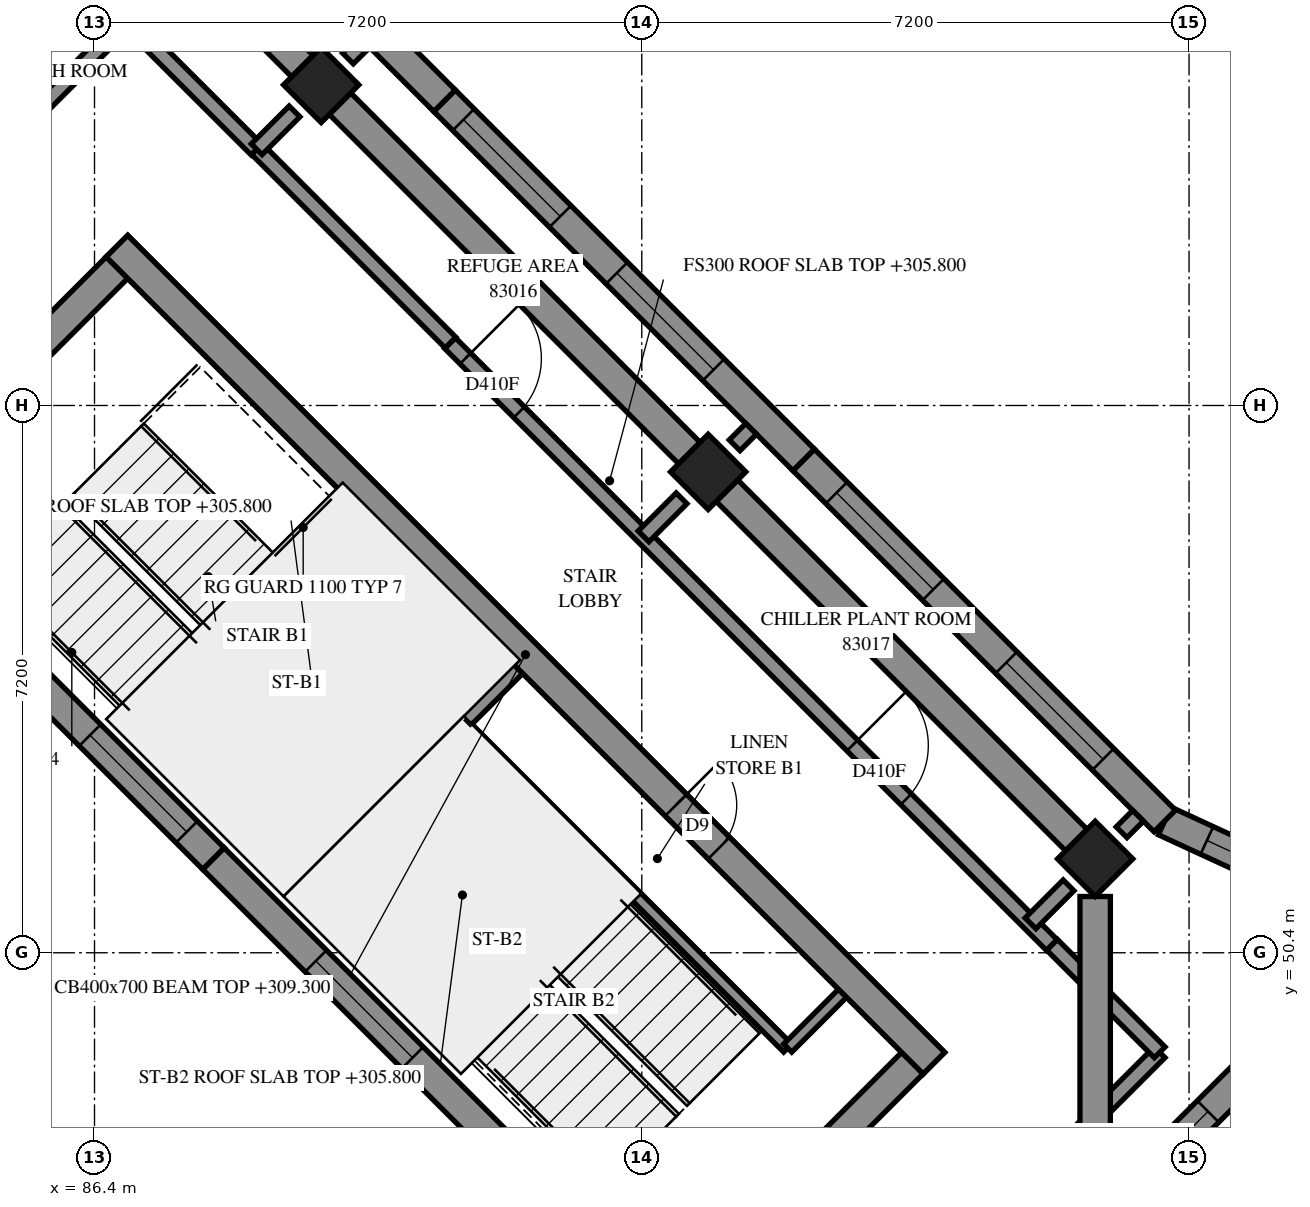
"""IFC4 building model, lengths in metres.
Left out: names, types, materials, properties, quantities, classifications, styles, units other than length and angle.
Written with IfcOpenShell. Run it as: python <this file> out.ifc"""

import sys

from ifc_helpers import new_model, si_unit, direction, frame, frame_2d, origin, origin_2d, place, context, subcontext, project, spatial, polyline, rectangle, outline, extrude, element, fill, save


model = new_model("IFC4")
c1 = context("Model", 3, precision=1e-05, world=origin(), true_north=direction((0.0, 1.0)))
c2 = subcontext(c1, "Body", "Model", "MODEL_VIEW")
j1 = project(units=[si_unit("LENGTHUNIT", "METRE"), si_unit("PLANEANGLEUNIT", "RADIAN")], contexts=[c1])
p1 = place(None, origin())
s1 = spatial("IfcSite", under=j1, at=p1, CompositionType="ELEMENT")
p2 = place(p1, origin())
s2 = spatial("IfcBuilding", under=s1, at=p2, CompositionType="ELEMENT")
p3 = place(p2, frame((0.0, 0.0, 305.8)))
s3 = spatial("IfcBuildingStorey", under=s2, at=p3, CompositionType="ELEMENT", Elevation=305.8)
for number, where, z_axis, x_axis in (
    (1, (89.382, 61.818, 0.0), (0.0, 0.0, 1.0), (0.707, -0.707, 0.0)),
    (2, (94.474, 56.727, 0.0), (0.0, 0.0, 1.0), (0.707, -0.707, 0.0)),
    (3, (99.565, 51.635, 0.0), (0.0, 0.0, 1.0), (0.707, -0.707, 0.0)),
):
    element("IfcColumn", number, at=place(p3, frame(where, z_axis=z_axis, x_axis=x_axis)), inside=s3, PredefinedType="COLUMN", context=c2, shape_type="SweptSolid", body=[
        extrude(rectangle(XDim=0.7, YDim=0.7, at=origin_2d()), origin(), (0.0, 0.0, 1.0), 3.5),
    ])
p4 = place(p3, frame((86.695, 59.696, -0.3), z_axis=(0.0, 0.0, 1.0), x_axis=(0.7071100706, -0.7071034917, 0.0)))
e4 = element("IfcWall", 4, at=p4, inside=s3, PredefinedType="SHEAR", context=c2, shape_type="SweptSolid", body=[
    extrude(outline(polyline([(0.0, 0.0), (15.2, 0.0), (15.2, 3.1), (0.0, 3.1), (0.0, 0.0)])), frame((0.0, 0.2, 0.0), z_axis=(0.0, -1.0, 0.0), x_axis=(1.0, 0.0, 0.0)), (0.0, 0.0, 1.0), 0.4),
])
p5 = place(p4, frame((10.4, 0.0, 0.3)))
e5 = element("IfcOpeningElement", 5, at=p5, cuts=e4, PredefinedType="OPENING", context=c2, shape_type="SweptSolid", body=[
    extrude(rectangle(XDim=0.8, YDim=2.1, at=frame_2d((0.4, 1.05))), frame((0.0, 0.21, 0.0), z_axis=(0.0, -1.0, 0.0), x_axis=(1.0, 0.0, 0.0)), (0.0, 0.0, 1.0), 0.42),
])
p6 = place(p3, frame((83.796, 56.514, -0.3), z_axis=(0.0, 0.0, 1.0), x_axis=(0.7071067812, 0.7071067812, 0.0)))
e6 = element("IfcWall", 6, at=p6, inside=s3, PredefinedType="SHEAR", context=c2, shape_type="SweptSolid", body=[
    extrude(outline(polyline([(0.0, 0.0), (4.1, 0.0), (4.1, 3.1), (0.0, 3.1), (0.0, 0.0)])), frame((0.0, 0.2, 0.0), z_axis=(0.0, -1.0, 0.0), x_axis=(1.0, 0.0, 0.0)), (0.0, 0.0, 1.0), 0.4),
])
p7 = place(p6, frame((1.05, 0.0, 0.3)))
e7 = element("IfcOpeningElement", 7, at=p7, cuts=e6, PredefinedType="OPENING", context=c2, shape_type="SweptSolid", body=[
    extrude(rectangle(XDim=1.1, YDim=2.1, at=frame_2d((0.55, 1.05))), frame((0.0, 0.21, 0.0), z_axis=(0.0, -1.0, 0.0), x_axis=(1.0, 0.0, 0.0)), (0.0, 0.0, 1.0), 0.42),
])
p8 = place(p3, frame((94.261, 46.049, -0.3), z_axis=(0.0, 0.0, 1.0), x_axis=(0.7071067812, 0.7071067812, 0.0)))
e8 = element("IfcWall", 8, at=p8, inside=s3, PredefinedType="SHEAR", context=c2, shape_type="SweptSolid", body=[
    extrude(outline(polyline([(0.0, 0.0), (4.1, 0.0), (4.1, 3.1), (0.0, 3.1), (0.0, 0.0)])), frame((0.0, 0.2, 0.0), z_axis=(0.0, -1.0, 0.0), x_axis=(1.0, 0.0, 0.0)), (0.0, 0.0, 1.0), 0.4),
])
p9 = place(p8, frame((1.05, 0.0, 0.3)))
e9 = element("IfcOpeningElement", 9, at=p9, cuts=e8, PredefinedType="OPENING", context=c2, shape_type="SweptSolid", body=[
    extrude(rectangle(XDim=1.1, YDim=2.1, at=frame_2d((0.55, 1.05))), frame((0.0, 0.21, 0.0), z_axis=(0.0, -1.0, 0.0), x_axis=(1.0, 0.0, 0.0)), (0.0, 0.0, 1.0), 0.42),
])
p10 = place(p3, frame((89.029, 51.282, 0.0), z_axis=(0.0, 0.0, 1.0), x_axis=(0.7071067812, 0.7071067812, 0.0)))
e10 = element("IfcWall", 10, at=p10, inside=s3, PredefinedType="SOLIDWALL", context=c2, shape_type="SweptSolid", body=[
    extrude(outline(polyline([(0.0, 0.0), (4.1, 0.0), (4.1, 3.5), (0.0, 3.5), (0.0, 0.0)])), frame((0.0, 0.15, 0.0), z_axis=(0.0, -1.0, 0.0), x_axis=(1.0, 0.0, 0.0)), (0.0, 0.0, 1.0), 0.3),
])
p11 = place(p3, frame((99.282, 46.544, 0.0), z_axis=(0.0, 0.0, 1.0), x_axis=(0.7071067812, 0.7071067812, 0.0)))
e11 = element("IfcWall", 11, at=p11, inside=s3, PredefinedType="SOLIDWALL", context=c2, shape_type="SweptSolid", body=[
    extrude(outline(polyline([(0.2, -0.2), (6.23, -0.2), (5.657, 0.2), (-0.2, 0.2), (0.2, -0.2)])), origin(), (0.0, 0.0, 1.0), 3.5),
])
p12 = place(p11, frame((0.7, 0.0, 0.7)))
e12 = element("IfcOpeningElement", 12, at=p12, cuts=e11, PredefinedType="OPENING", context=c2, shape_type="SweptSolid", body=[
    extrude(rectangle(XDim=1.8, YDim=2.2, at=frame_2d((0.9, 1.1))), frame((0.0, 0.21, 0.0), z_axis=(0.0, -1.0, 0.0), x_axis=(1.0, 0.0, 0.0)), (0.0, 0.0, 1.0), 0.42),
])
p13 = place(p3, frame((103.484, 50.747, 0.0), z_axis=(0.0, 0.0, 1.0), x_axis=(-0.9078558767, 0.4192823716, 0.0)))
e13 = element("IfcWall", 13, at=p13, inside=s3, PredefinedType="SOLIDWALL", context=c2, shape_type="SweptSolid", body=[
    extrude(outline(polyline([(-0.287, -0.2), (3.273, -0.2), (3.345, 0.2), (0.287, 0.2), (-0.287, -0.2)])), origin(), (0.0, 0.0, 1.0), 3.5),
])
p14 = place(p13, frame((0.898, 0.0, 0.7)))
e14 = element("IfcOpeningElement", 14, at=p14, cuts=e13, PredefinedType="OPENING", context=c2, shape_type="SweptSolid", body=[
    extrude(rectangle(XDim=1.8, YDim=2.2, at=frame_2d((0.9, 1.1))), frame((0.0, 0.21, 0.0), z_axis=(0.0, -1.0, 0.0), x_axis=(1.0, 0.0, 0.0)), (0.0, 0.0, 1.0), 0.42),
])
p15 = place(p3, frame((100.48, 52.134, 0.0), z_axis=(0.0, 0.0, 1.0), x_axis=(-0.7071067812, 0.7071067812, 0.0)))
e15 = element("IfcWall", 15, at=p15, inside=s3, PredefinedType="SOLIDWALL", context=c2, shape_type="SweptSolid", body=[
    extrude(outline(polyline([(0.036, -0.2), (6.718, -0.2), (6.718, 0.2), (-0.036, 0.2), (0.036, -0.2)])), origin(), (0.0, 0.0, 1.0), 3.5),
])
p16 = place(p15, frame((1.147, 0.0, 0.7)))
e16 = element("IfcOpeningElement", 16, at=p16, cuts=e15, PredefinedType="OPENING", context=c2, shape_type="SweptSolid", body=[
    extrude(rectangle(XDim=1.8, YDim=2.2, at=frame_2d((0.9, 1.1))), frame((0.0, 0.21, 0.0), z_axis=(0.0, -1.0, 0.0), x_axis=(1.0, 0.0, 0.0)), (0.0, 0.0, 1.0), 0.42),
])
p17 = place(p15, frame((4.306, 0.0, 0.7)))
e17 = element("IfcOpeningElement", 17, at=p17, cuts=e15, PredefinedType="OPENING", context=c2, shape_type="SweptSolid", body=[
    extrude(rectangle(XDim=1.8, YDim=2.2, at=frame_2d((0.9, 1.1))), frame((0.0, 0.21, 0.0), z_axis=(0.0, -1.0, 0.0), x_axis=(1.0, 0.0, 0.0)), (0.0, 0.0, 1.0), 0.42),
])
p18 = place(p3, frame((95.73, 56.884, 0.0), z_axis=(0.0, 0.0, 1.0), x_axis=(-0.7071067812, 0.7071067812, 0.0)))
e18 = element("IfcWall", 18, at=p18, inside=s3, PredefinedType="SOLIDWALL", context=c2, shape_type="SweptSolid", body=[
    extrude(outline(polyline([(0.0, -0.2), (6.682, -0.2), (6.682, 0.2), (0.0, 0.2), (0.0, -0.2)])), origin(), (0.0, 0.0, 1.0), 3.5),
])
p19 = place(p18, frame((1.677, 0.0, 0.7)))
e19 = element("IfcOpeningElement", 19, at=p19, cuts=e18, PredefinedType="OPENING", context=c2, shape_type="SweptSolid", body=[
    extrude(rectangle(XDim=1.8, YDim=2.2, at=frame_2d((0.9, 1.1))), frame((0.0, 0.21, 0.0), z_axis=(0.0, -1.0, 0.0), x_axis=(1.0, 0.0, 0.0)), (0.0, 0.0, 1.0), 0.42),
])
p20 = place(p18, frame((4.529, 0.0, 0.7)))
e20 = element("IfcOpeningElement", 20, at=p20, cuts=e18, PredefinedType="OPENING", context=c2, shape_type="SweptSolid", body=[
    extrude(rectangle(XDim=1.8, YDim=2.2, at=frame_2d((0.9, 1.1))), frame((0.0, 0.21, 0.0), z_axis=(0.0, -1.0, 0.0), x_axis=(1.0, 0.0, 0.0)), (0.0, 0.0, 1.0), 0.42),
])
p21 = place(p3, frame((91.005, 61.609, 0.0), z_axis=(0.0, 0.0, 1.0), x_axis=(-0.7071142638, 0.7070992985, 0.0)))
e21 = element("IfcWall", 21, at=p21, inside=s3, PredefinedType="SOLIDWALL", context=c2, shape_type="SweptSolid", body=[
    extrude(outline(polyline([(0.0, -0.2), (6.682, -0.2), (6.682, 0.2), (0.0, 0.2), (0.0, -0.2)])), origin(), (0.0, 0.0, 1.0), 3.5),
])
p22 = place(p21, frame((2.195, 0.0, 0.7)))
e22 = element("IfcOpeningElement", 22, at=p22, cuts=e21, PredefinedType="OPENING", context=c2, shape_type="SweptSolid", body=[
    extrude(rectangle(XDim=1.8, YDim=2.2, at=frame_2d((0.9, 1.1))), frame((0.0, 0.21, 0.0), z_axis=(0.0, -1.0, 0.0), x_axis=(1.0, 0.0, 0.0)), (0.0, 0.0, 1.0), 0.42),
])
p23 = place(p3, frame((83.269, 56.334, 0.0), z_axis=(0.0, 0.0, 1.0), x_axis=(0.7071067812, -0.7071067812, 0.0)))
e23 = element("IfcWall", 23, at=p23, inside=s3, PredefinedType="SOLIDWALL", context=c2, shape_type="SweptSolid", body=[
    extrude(outline(polyline([(0.0, -0.2), (6.641, -0.2), (6.641, 0.2), (0.0, 0.2), (0.0, -0.2)])), origin(), (0.0, 0.0, 1.0), 3.5),
])
p24 = place(p23, frame((1.345, 0.0, 0.7)))
e24 = element("IfcOpeningElement", 24, at=p24, cuts=e23, PredefinedType="OPENING", context=c2, shape_type="SweptSolid", body=[
    extrude(rectangle(XDim=1.8, YDim=2.2, at=frame_2d((0.9, 1.1))), frame((0.0, 0.21, 0.0), z_axis=(0.0, -1.0, 0.0), x_axis=(1.0, 0.0, 0.0)), (0.0, 0.0, 1.0), 0.42),
])
p25 = place(p23, frame((4.343, 0.0, 0.7)))
e25 = element("IfcOpeningElement", 25, at=p25, cuts=e23, PredefinedType="OPENING", context=c2, shape_type="SweptSolid", body=[
    extrude(rectangle(XDim=1.8, YDim=2.2, at=frame_2d((0.9, 1.1))), frame((0.0, 0.21, 0.0), z_axis=(0.0, -1.0, 0.0), x_axis=(1.0, 0.0, 0.0)), (0.0, 0.0, 1.0), 0.42),
])
p26 = place(p3, frame((87.966, 51.638, 0.0), z_axis=(0.0, 0.0, 1.0), x_axis=(0.7071143097, -0.7070992526, 0.0)))
e26 = element("IfcWall", 26, at=p26, inside=s3, PredefinedType="SOLIDWALL", context=c2, shape_type="SweptSolid", body=[
    extrude(outline(polyline([(0.0, -0.2), (6.641, -0.2), (6.641, 0.2), (0.0, 0.2), (0.0, -0.2)])), origin(), (0.0, 0.0, 1.0), 3.5),
])
p27 = place(p26, frame((1.903, 0.0, 0.7)))
e27 = element("IfcOpeningElement", 27, at=p27, cuts=e26, PredefinedType="OPENING", context=c2, shape_type="SweptSolid", body=[
    extrude(rectangle(XDim=1.8, YDim=2.2, at=frame_2d((0.9, 1.1))), frame((0.0, 0.21, 0.0), z_axis=(0.0, -1.0, 0.0), x_axis=(1.0, 0.0, 0.0)), (0.0, 0.0, 1.0), 0.42),
])
p28 = place(p3, frame((91.313, 53.354, 0.0), z_axis=(0.0, 0.0, 1.0), x_axis=(0.7071067812, -0.7071067812, 0.0)))
e28 = element("IfcWall", 28, at=p28, inside=s3, PredefinedType="PARTITIONING", context=c2, shape_type="SweptSolid", body=[
    extrude(outline(polyline([(0.0, 0.0), (5.95, 0.0), (5.95, 3.5), (0.0, 3.5), (0.0, 0.0)])), frame((0.0, 0.075, 0.0), z_axis=(0.0, -1.0, 0.0), x_axis=(1.0, 0.0, 0.0)), (0.0, 0.0, 1.0), 0.15),
])
p29 = place(p3, frame((95.52, 49.146, 0.0), z_axis=(0.0, 0.0, 1.0), x_axis=(0.7071067812, 0.7071067812, 0.0)))
e29 = element("IfcWall", 29, at=p29, inside=s3, PredefinedType="PARTITIONING", context=c2, shape_type="SweptSolid", body=[
    extrude(outline(polyline([(0.0, 0.0), (1.02, 0.0), (1.02, 3.5), (0.0, 3.5), (0.0, 0.0)])), frame((0.0, 0.075, 0.0), z_axis=(0.0, -1.0, 0.0), x_axis=(1.0, 0.0, 0.0)), (0.0, 0.0, 1.0), 0.15),
])
p30 = place(p3, frame((91.077, 58.421, 0.0), z_axis=(0.0, 0.0, 1.0), x_axis=(0.7070532037, -0.7071603546, 0.0)))
e30 = element("IfcWall", 30, at=p30, inside=s3, PredefinedType="PARTITIONING", context=c2, shape_type="SweptSolid", body=[
    extrude(rectangle(XDim=11.199, YDim=0.2, at=frame_2d((5.6, 0.0))), origin(), (0.0, 0.0, 1.0), 3.5),
])
p31 = place(p30, frame((0.286, 0.0, 0.0)))
e31 = element("IfcOpeningElement", 31, at=p31, cuts=e30, PredefinedType="OPENING", context=c2, shape_type="SweptSolid", body=[
    extrude(rectangle(XDim=1.0, YDim=2.1, at=frame_2d((0.5, 1.05))), frame((0.0, 0.11, 0.0), z_axis=(0.0, -1.0, 0.0), x_axis=(1.0, 0.0, 0.0)), (0.0, 0.0, 1.0), 0.22),
])
p32 = place(p30, frame((7.486, 0.0, 0.0)))
e32 = element("IfcOpeningElement", 32, at=p32, cuts=e30, PredefinedType="OPENING", context=c2, shape_type="SweptSolid", body=[
    extrude(rectangle(XDim=1.0, YDim=2.1, at=frame_2d((0.5, 1.05))), frame((0.0, 0.11, 0.0), z_axis=(0.0, -1.0, 0.0), x_axis=(1.0, 0.0, 0.0)), (0.0, 0.0, 1.0), 0.22),
])
p33 = place(p3, frame((97.655, 46.333, 0.0), z_axis=(0.0, 0.0, 1.0), x_axis=(0.7071067812, 0.7071067812, 0.0)))
e33 = element("IfcWall", 33, at=p33, inside=s3, PredefinedType="PARTITIONING", context=c2, shape_type="SweptSolid", body=[
    extrude(rectangle(XDim=3.9, YDim=0.2, at=frame_2d((1.95, 0.0))), origin(), (0.0, 0.0, 1.0), 3.5),
])
p34 = place(p33, frame((0.221, 0.0, 0.0)))
e34 = element("IfcOpeningElement", 34, at=p34, cuts=e33, PredefinedType="OPENING", context=c2, shape_type="SweptSolid", body=[
    extrude(rectangle(XDim=1.0, YDim=2.1, at=frame_2d((0.5, 1.05))), frame((0.0, 0.11, 0.0), z_axis=(0.0, -1.0, 0.0), x_axis=(1.0, 0.0, 0.0)), (0.0, 0.0, 1.0), 0.22),
])
p35 = place(p3, frame((84.079, 59.91, 0.0), z_axis=(0.0, 0.0, 1.0), x_axis=(0.7071067812, 0.7071067812, 0.0)))
e35 = element("IfcWall", 35, at=p35, inside=s3, PredefinedType="PARTITIONING", context=c2, shape_type="SweptSolid", body=[
    extrude(rectangle(XDim=3.898, YDim=0.2, at=frame_2d((1.949, 0.0))), origin(), (0.0, 0.0, 1.0), 3.5),
])
p36 = place(p35, frame((0.219, 0.0, 0.0)))
e36 = element("IfcOpeningElement", 36, at=p36, cuts=e35, PredefinedType="OPENING", context=c2, shape_type="SweptSolid", body=[
    extrude(rectangle(XDim=1.0, YDim=2.1, at=frame_2d((0.5, 1.05))), frame((0.0, 0.11, 0.0), z_axis=(0.0, -1.0, 0.0), x_axis=(1.0, 0.0, 0.0)), (0.0, 0.0, 1.0), 0.22),
])
p37 = place(p3, frame((88.537, 60.973, 0.0), z_axis=(0.0, 0.0, 1.0), x_axis=(0.7071067812, -0.7071067812, 0.0)))
e37 = element("IfcWall", 37, at=p37, inside=s3, PredefinedType="PARTITIONING", context=c2, shape_type="SweptSolid", body=[
    extrude(rectangle(XDim=3.601, YDim=0.2, at=frame_2d((1.8, 0.0))), origin(), (0.0, 0.0, 1.0), 3.5),
])
p38 = place(p3, frame((86.833, 62.663, 0.0), z_axis=(0.0, 0.0, 1.0), x_axis=(0.7075233388, -0.706689978, 0.0)))
e38 = element("IfcWall", 38, at=p38, inside=s3, PredefinedType="PARTITIONING", context=c2, shape_type="SweptSolid", body=[
    extrude(rectangle(XDim=2.4, YDim=0.2, at=frame_2d((1.2, 0.0))), origin(), (0.0, 0.0, 1.0), 3.5),
])
p39 = place(p3, frame((98.998, 50.504, 0.0), z_axis=(0.0, 0.0, 1.0), x_axis=(0.7076063266, -0.7066068826, 0.0)))
e39 = element("IfcWall", 39, at=p39, inside=s3, PredefinedType="PARTITIONING", context=c2, shape_type="SweptSolid", body=[
    extrude(rectangle(XDim=2.001, YDim=0.2, at=frame_2d((1.001, 0.0))), origin(), (0.0, 0.0, 1.0), 3.5),
])
for number, where, z_axis, x_axis in (
    (40, (93.624, 55.878, 0.0), (0.0, 0.0, 1.0), (0.707, 0.707, 0.0)),
    (41, (98.715, 50.787, 0.0), (0.0, 0.0, 1.0), (0.707, 0.707, 0.0)),
):
    element("IfcWall", number, at=place(p3, frame(where, z_axis=z_axis, x_axis=x_axis)), inside=s3, PredefinedType="PARTITIONING", context=c2, shape_type="SweptSolid", body=[
        extrude(rectangle(XDim=0.707, YDim=0.2, at=frame_2d((0.353, 0.0))), origin(), (0.0, 0.0, 1.0), 3.5),
    ])
p40 = place(p3, frame((88.534, 60.971, 0.0), z_axis=(0.0, 0.0, 1.0), x_axis=(0.7071067812, 0.7071067812, 0.0)))
e42 = element("IfcWall", 42, at=p40, inside=s3, PredefinedType="PARTITIONING", context=c2, shape_type="SweptSolid", body=[
    extrude(rectangle(XDim=0.704, YDim=0.2, at=frame_2d((0.352, 0.0))), origin(), (0.0, 0.0, 1.0), 3.5),
])
p41 = place(p3, frame((83.232, 60.756, 0.0), z_axis=(0.0, 0.0, 1.0), x_axis=(0.7072593155, 0.706954214, 0.0)))
e43 = element("IfcWall", 43, at=p41, inside=s3, PredefinedType="PARTITIONING", context=c2, shape_type="SweptSolid", body=[
    extrude(outline(polyline([(0.0, -0.1), (5.9, -0.1), (5.9, 0.1), (0.0, 0.1), (0.0, -0.1)])), origin(), (0.0, 0.0, 1.0), 3.5),
])
for number, where, z_axis, x_axis in (
    (44, (94.822, 57.076, 0.0), (0.0, 0.0, 1.0), (0.707, 0.707, 0.0)),
    (45, (99.913, 51.985, 0.0), (0.0, 0.0, 1.0), (0.707, 0.707, 0.0)),
):
    element("IfcWall", number, at=place(p3, frame(where, z_axis=z_axis, x_axis=x_axis)), inside=s3, PredefinedType="PARTITIONING", context=c2, shape_type="SweptSolid", body=[
        extrude(outline(polyline([(0.0, -0.1), (0.306, -0.1), (0.306, 0.1), (0.0, 0.1), (0.0, -0.1)])), origin(), (0.0, 0.0, 1.0), 3.5),
    ])
p42 = place(p3, frame((89.734, 62.166, 0.0), z_axis=(0.0, 0.0, 1.0), x_axis=(0.7089070674, 0.7053018997, 0.0)))
e46 = element("IfcWall", 46, at=p42, inside=s3, PredefinedType="PARTITIONING", context=c2, shape_type="SweptSolid", body=[
    extrude(outline(polyline([(0.0, -0.1), (0.305, -0.1), (0.305, 0.1), (0.0, 0.1), (0.0, -0.1)])), origin(), (0.0, 0.0, 1.0), 3.5),
])
p43 = place(p12, origin())
e47 = element("IfcWindow", 47, at=p43, inside=s3, PartitioningType="SINGLE_PANEL", PredefinedType="WINDOW", context=c2, shape_type="SweptSolid", body=[
    extrude(rectangle(XDim=1.8, YDim=2.2, at=frame_2d((0.9, 1.1))), frame((0.0, 0.08, 0.0), z_axis=(0.0, -1.0, 0.0), x_axis=(1.0, 0.0, 0.0)), (0.0, 0.0, 1.0), 0.06),
])
fill(e12, e47)
p44 = place(p14, origin())
e48 = element("IfcWindow", 48, at=p44, inside=s3, PartitioningType="SINGLE_PANEL", PredefinedType="WINDOW", context=c2, shape_type="SweptSolid", body=[
    extrude(rectangle(XDim=1.8, YDim=2.2, at=frame_2d((0.9, 1.1))), frame((0.0, 0.08, 0.0), z_axis=(0.0, -1.0, 0.0), x_axis=(1.0, 0.0, 0.0)), (0.0, 0.0, 1.0), 0.06),
])
fill(e14, e48)
p45 = place(p16, origin())
e49 = element("IfcWindow", 49, at=p45, inside=s3, PartitioningType="SINGLE_PANEL", PredefinedType="WINDOW", context=c2, shape_type="SweptSolid", body=[
    extrude(rectangle(XDim=1.8, YDim=2.2, at=frame_2d((0.9, 1.1))), frame((0.0, 0.08, 0.0), z_axis=(0.0, -1.0, 0.0), x_axis=(1.0, 0.0, 0.0)), (0.0, 0.0, 1.0), 0.06),
])
fill(e16, e49)
p46 = place(p17, origin())
e50 = element("IfcWindow", 50, at=p46, inside=s3, PartitioningType="SINGLE_PANEL", PredefinedType="WINDOW", context=c2, shape_type="SweptSolid", body=[
    extrude(rectangle(XDim=1.8, YDim=2.2, at=frame_2d((0.9, 1.1))), frame((0.0, 0.08, 0.0), z_axis=(0.0, -1.0, 0.0), x_axis=(1.0, 0.0, 0.0)), (0.0, 0.0, 1.0), 0.06),
])
fill(e17, e50)
p47 = place(p19, origin())
e51 = element("IfcWindow", 51, at=p47, inside=s3, PartitioningType="SINGLE_PANEL", PredefinedType="WINDOW", context=c2, shape_type="SweptSolid", body=[
    extrude(rectangle(XDim=1.8, YDim=2.2, at=frame_2d((0.9, 1.1))), frame((0.0, 0.08, 0.0), z_axis=(0.0, -1.0, 0.0), x_axis=(1.0, 0.0, 0.0)), (0.0, 0.0, 1.0), 0.06),
])
fill(e19, e51)
p48 = place(p20, origin())
e52 = element("IfcWindow", 52, at=p48, inside=s3, PartitioningType="SINGLE_PANEL", PredefinedType="WINDOW", context=c2, shape_type="SweptSolid", body=[
    extrude(rectangle(XDim=1.8, YDim=2.2, at=frame_2d((0.9, 1.1))), frame((0.0, 0.08, 0.0), z_axis=(0.0, -1.0, 0.0), x_axis=(1.0, 0.0, 0.0)), (0.0, 0.0, 1.0), 0.06),
])
fill(e20, e52)
p49 = place(p25, origin())
e53 = element("IfcWindow", 53, at=p49, inside=s3, PartitioningType="SINGLE_PANEL", PredefinedType="WINDOW", context=c2, shape_type="SweptSolid", body=[
    extrude(rectangle(XDim=1.8, YDim=2.2, at=frame_2d((0.9, 1.1))), frame((0.0, 0.08, 0.0), z_axis=(0.0, -1.0, 0.0), x_axis=(1.0, 0.0, 0.0)), (0.0, 0.0, 1.0), 0.06),
])
fill(e25, e53)
p50 = place(p27, origin())
e54 = element("IfcWindow", 54, at=p50, inside=s3, PartitioningType="SINGLE_PANEL", PredefinedType="WINDOW", context=c2, shape_type="SweptSolid", body=[
    extrude(rectangle(XDim=1.8, YDim=2.2, at=frame_2d((0.9, 1.1))), frame((0.0, 0.08, 0.0), z_axis=(0.0, -1.0, 0.0), x_axis=(1.0, 0.0, 0.0)), (0.0, 0.0, 1.0), 0.06),
])
fill(e27, e54)
p51 = place(p5, origin())
e55 = element("IfcDoor", 55, at=p51, inside=s3, OperationType="SINGLE_SWING_RIGHT", PredefinedType="DOOR", context=c2, shape_type="SweptSolid", body=[
    extrude(rectangle(XDim=0.8, YDim=2.1, at=frame_2d((0.4, 1.05))), frame((0.0, 0.025, 0.0), z_axis=(0.0, -1.0, 0.0), x_axis=(1.0, 0.0, 0.0)), (0.0, 0.0, 1.0), 0.05),
])
fill(e5, e55)
p52 = place(p31, origin())
e56 = element("IfcDoor", 56, at=p52, inside=s3, OperationType="SINGLE_SWING_LEFT", PredefinedType="DOOR", context=c2, shape_type="SweptSolid", body=[
    extrude(rectangle(XDim=1.0, YDim=2.1, at=frame_2d((0.5, 1.05))), frame((0.0, 0.025, 0.0), z_axis=(0.0, -1.0, 0.0), x_axis=(1.0, 0.0, 0.0)), (0.0, 0.0, 1.0), 0.05),
])
fill(e31, e56)
p53 = place(p32, origin())
e57 = element("IfcDoor", 57, at=p53, inside=s3, OperationType="SINGLE_SWING_LEFT", PredefinedType="DOOR", context=c2, shape_type="SweptSolid", body=[
    extrude(rectangle(XDim=1.0, YDim=2.1, at=frame_2d((0.5, 1.05))), frame((0.0, 0.025, 0.0), z_axis=(0.0, -1.0, 0.0), x_axis=(1.0, 0.0, 0.0)), (0.0, 0.0, 1.0), 0.05),
])
fill(e32, e57)
save(model, sys.argv[1])
